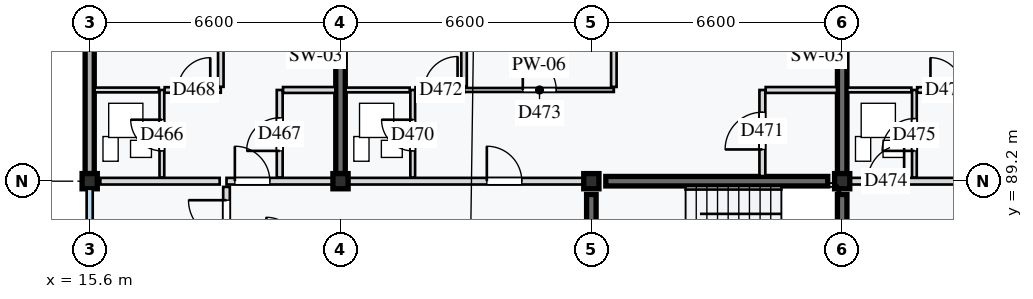
"""IFC4 building model, lengths in metres.
Left out: names, types, materials, properties, quantities, classifications, styles, units other than length and angle.
Written with IfcOpenShell. Run it as: python <this file> out.ifc"""

import sys

from ifc_helpers import new_model, si_unit, direction, frame, frame_2d, origin, origin_2d, place, context, subcontext, project, spatial, rectangle, extrude, element, fill, save


model = new_model("IFC4")
c1 = context("Model", 3, precision=1e-05, world=origin(), true_north=direction((0.0, 1.0)))
c2 = subcontext(c1, "Body", "Model", "MODEL_VIEW")
j1 = project(units=[si_unit("LENGTHUNIT", "METRE"), si_unit("PLANEANGLEUNIT", "RADIAN")], contexts=[c1])
p1 = place(None, origin())
s1 = spatial("IfcSite", under=j1, at=p1, CompositionType="ELEMENT")
p2 = place(p1, origin())
s2 = spatial("IfcBuilding", under=s1, at=p2, CompositionType="ELEMENT")
p3 = place(p2, frame((0.0, 0.0, 46.8)))
s3 = spatial("IfcBuildingStorey", under=s2, at=p3, CompositionType="ELEMENT", Elevation=46.8)
for number, where, z_axis, x_axis in (
    (1, (15.6, 89.2, 0.0), (0.0, 0.0, 1.0), (1.0, 0.0, 0.0)),
    (2, (22.2, 89.2, 0.0), (0.0, 0.0, 1.0), (1.0, 0.0, 0.0)),
    (3, (28.8, 89.2, 0.0), (0.0, 0.0, 1.0), (1.0, 0.0, 0.0)),
    (4, (35.4, 89.2, 0.0), (0.0, 0.0, 1.0), (1.0, 0.0, 0.0)),
):
    element("IfcColumn", number, at=place(p3, frame(where, z_axis=z_axis, x_axis=x_axis)), inside=s3, PredefinedType="COLUMN", context=c2, shape_type="SweptSolid", body=[
        extrude(rectangle(XDim=0.4, YDim=0.4, at=origin_2d()), origin(), (0.0, 0.0, 1.0), 3.2),
    ])
p4 = place(p3, frame((29.18, 89.2, 0.0), z_axis=(0.0, 0.0, 1.0), x_axis=(1.0, 0.0, 0.0)))
e5 = element("IfcWall", 5, at=p4, inside=s3, PredefinedType="SHEAR", context=c2, shape_type="SweptSolid", body=[
    extrude(rectangle(XDim=5.84, YDim=0.25, at=frame_2d((2.92, 0.0))), origin(), (0.0, 0.0, 1.0), 2.98),
])
for number, where, z_axis, x_axis in (
    (6, (28.8, 86.05, 0.0), (0.0, 0.0, 1.0), (0.0, 1.0, 0.0)),
    (7, (35.4, 86.05, 0.0), (0.0, 0.0, 1.0), (0.0, 1.0, 0.0)),
):
    element("IfcWall", number, at=place(p3, frame(where, z_axis=z_axis, x_axis=x_axis)), inside=s3, PredefinedType="SHEAR", context=c2, shape_type="SweptSolid", body=[
        extrude(rectangle(XDim=2.8, YDim=0.25, at=frame_2d((1.4, 0.0))), origin(), (0.0, 0.0, 1.0), 2.98),
    ])
for number, where, z_axis, x_axis in (
    (8, (22.2, 89.4, 0.0), (0.0, 0.0, 1.0), (0.0, 1.0, 0.0)),
    (9, (35.4, 89.4, 0.0), (0.0, 0.0, 1.0), (0.0, 1.0, 0.0)),
):
    element("IfcWall", number, at=place(p3, frame(where, z_axis=z_axis, x_axis=x_axis)), inside=s3, PredefinedType="SHEAR", context=c2, shape_type="SweptSolid", body=[
        extrude(rectangle(XDim=6.2, YDim=0.25, at=frame_2d((3.1, 0.0))), origin(), (0.0, 0.0, 1.0), 2.98),
    ])
p5 = place(p3, frame((15.6, 89.4, 0.0), z_axis=(0.0, 0.0, 1.0), x_axis=(0.0, 1.0, 0.0)))
e10 = element("IfcWall", 10, at=p5, inside=s3, PredefinedType="STANDARD", context=c2, shape_type="SweptSolid", body=[
    extrude(rectangle(XDim=6.2, YDim=0.24, at=frame_2d((3.1, 0.0))), origin(), (0.0, 0.0, 1.0), 2.65),
])
p6 = place(p3, frame((19.2, 86.05, 0.0), z_axis=(0.0, 0.0, 1.0), x_axis=(0.0, 1.0, 0.0)))
e11 = element("IfcWall", 11, at=p6, inside=s3, PredefinedType="PARTITIONING", context=c2, shape_type="SweptSolid", body=[
    extrude(rectangle(XDim=3.0, YDim=0.175, at=frame_2d((1.5, 0.0))), origin(), (0.0, 0.0, 1.0), 2.98),
])
p7 = place(p6, frame((1.65, 0.0, 0.0)))
e12 = element("IfcOpeningElement", 12, at=p7, cuts=e11, PredefinedType="OPENING", context=c2, shape_type="SweptSolid", body=[
    extrude(rectangle(XDim=1.0, YDim=2.1, at=frame_2d((0.5, 1.05))), frame((0.0, 0.097, 0.0), z_axis=(0.0, -1.0, 0.0), x_axis=(1.0, 0.0, 0.0)), (0.0, 0.0, 1.0), 0.195),
])
p8 = place(p3, frame((15.88, 89.2, 0.0), z_axis=(0.0, 0.0, 1.0), x_axis=(1.0, 0.0, 0.0)))
e13 = element("IfcWall", 13, at=p8, inside=s3, PredefinedType="PARTITIONING", context=c2, shape_type="SweptSolid", body=[
    extrude(rectangle(XDim=3.14, YDim=0.175, at=frame_2d((1.57, 0.0))), origin(), (0.0, 0.0, 1.0), 2.55),
])
p9 = place(p3, frame((19.2, 89.2, 0.0), z_axis=(0.0, 0.0, 1.0), x_axis=(1.0, 0.0, 0.0)))
e14 = element("IfcWall", 14, at=p9, inside=s3, PredefinedType="PARTITIONING", context=c2, shape_type="SweptSolid", body=[
    extrude(rectangle(XDim=3.0, YDim=0.175, at=frame_2d((1.5, 0.0))), origin(), (0.0, 0.0, 1.0), 2.55),
])
p10 = place(p9, frame((0.22, 0.0, 0.0)))
e15 = element("IfcOpeningElement", 15, at=p10, cuts=e14, PredefinedType="OPENING", context=c2, shape_type="SweptSolid", body=[
    extrude(rectangle(XDim=0.92, YDim=2.14, at=frame_2d((0.46, 1.07))), frame((0.0, 0.097, 0.0), z_axis=(0.0, -1.0, 0.0), x_axis=(1.0, 0.0, 0.0)), (0.0, 0.0, 1.0), 0.195),
])
p11 = place(p3, frame((17.5, 89.298, 0.0), z_axis=(0.0, 0.0, 1.0), x_axis=(0.0, 1.0, 0.0)))
e16 = element("IfcWall", 16, at=p11, inside=s3, PredefinedType="PARTITIONING", context=c2, shape_type="SweptSolid", body=[
    extrude(rectangle(XDim=2.302, YDim=0.125, at=frame_2d((1.151, 0.0))), origin(), (0.0, 0.0, 1.0), 2.98),
])
p12 = place(p11, frame((0.7, 0.0, 0.0)))
e17 = element("IfcOpeningElement", 17, at=p12, cuts=e16, PredefinedType="OPENING", context=c2, shape_type="SweptSolid", body=[
    extrude(rectangle(XDim=0.82, YDim=2.05, at=frame_2d((0.41, 1.025))), frame((0.0, 0.073, 0.0), z_axis=(0.0, -1.0, 0.0), x_axis=(1.0, 0.0, 0.0)), (0.0, 0.0, 1.0), 0.145),
])
p13 = place(p3, frame((15.73, 91.6, 0.0), z_axis=(0.0, 0.0, 1.0), x_axis=(1.0, 0.0, 0.0)))
e18 = element("IfcWall", 18, at=p13, inside=s3, PredefinedType="PARTITIONING", context=c2, shape_type="SweptSolid", body=[
    extrude(rectangle(XDim=1.69, YDim=0.125, at=frame_2d((0.845, 0.0))), origin(), (0.0, 0.0, 1.0), 2.98),
])
p14 = place(p3, frame((20.6, 89.298, 0.0), z_axis=(0.0, 0.0, 1.0), x_axis=(0.0, 1.0, 0.0)))
e19 = element("IfcWall", 19, at=p14, inside=s3, PredefinedType="PARTITIONING", context=c2, shape_type="SweptSolid", body=[
    extrude(rectangle(XDim=2.302, YDim=0.155, at=frame_2d((1.151, 0.0))), origin(), (0.0, 0.0, 1.0), 2.98),
])
p15 = place(p14, frame((0.7, 0.0, 0.0)))
e20 = element("IfcOpeningElement", 20, at=p15, cuts=e19, PredefinedType="OPENING", context=c2, shape_type="SweptSolid", body=[
    extrude(rectangle(XDim=0.87, YDim=2.08, at=frame_2d((0.435, 1.04))), frame((0.0, 0.087, 0.0), z_axis=(0.0, -1.0, 0.0), x_axis=(1.0, 0.0, 0.0)), (0.0, 0.0, 1.0), 0.175),
])
p16 = place(p3, frame((20.688, 91.6, 0.0), z_axis=(0.0, 0.0, 1.0), x_axis=(1.0, 0.0, 0.0)))
e21 = element("IfcWall", 21, at=p16, inside=s3, PredefinedType="PARTITIONING", context=c2, shape_type="SweptSolid", body=[
    extrude(rectangle(XDim=1.377, YDim=0.155, at=frame_2d((0.689, 0.0))), origin(), (0.0, 0.0, 1.0), 2.98),
])
p17 = place(p3, frame((17.573, 91.6, 0.0), z_axis=(0.0, 0.0, 1.0), x_axis=(1.0, 0.0, 0.0)))
e22 = element("IfcWall", 22, at=p17, inside=s3, PredefinedType="PARTITIONING", context=c2, shape_type="SweptSolid", body=[
    extrude(rectangle(XDim=1.478, YDim=0.145, at=frame_2d((0.739, 0.0))), origin(), (0.0, 0.0, 1.0), 2.98),
])
p18 = place(p17, frame((0.35, 0.0, 0.0)))
e23 = element("IfcOpeningElement", 23, at=p18, cuts=e22, PredefinedType="OPENING", context=c2, shape_type="SweptSolid", body=[
    extrude(rectangle(XDim=0.85, YDim=2.1, at=frame_2d((0.425, 1.05))), frame((0.0, 0.083, 0.0), z_axis=(0.0, -1.0, 0.0), x_axis=(1.0, 0.0, 0.0)), (0.0, 0.0, 1.0), 0.165),
])
p19 = place(p3, frame((19.05, 91.683, 0.0), z_axis=(0.0, 0.0, 1.0), x_axis=(0.0, 1.0, 0.0)))
e24 = element("IfcWall", 24, at=p19, inside=s3, PredefinedType="PARTITIONING", context=c2, shape_type="SweptSolid", body=[
    extrude(rectangle(XDim=3.987, YDim=0.145, at=frame_2d((1.994, 0.0))), origin(), (0.0, 0.0, 1.0), 2.98),
])
p20 = place(p3, frame((22.2, 89.2, 0.0), z_axis=(0.0, 0.0, 1.0), x_axis=(1.0, 0.0, 0.0)))
e25 = element("IfcWall", 25, at=p20, inside=s3, PredefinedType="PARTITIONING", context=c2, shape_type="SweptSolid", body=[
    extrude(rectangle(XDim=6.6, YDim=0.175, at=frame_2d((3.3, 0.0))), origin(), (0.0, 0.0, 1.0), 2.55),
])
p21 = place(p20, frame((3.85, 0.0, 0.0)))
e26 = element("IfcOpeningElement", 26, at=p21, cuts=e25, PredefinedType="OPENING", context=c2, shape_type="SweptSolid", body=[
    extrude(rectangle(XDim=0.92, YDim=2.14, at=frame_2d((0.46, 1.07))), frame((0.0, 0.097, 0.0), z_axis=(0.0, -1.0, 0.0), x_axis=(1.0, 0.0, 0.0)), (0.0, 0.0, 1.0), 0.195),
])
p22 = place(p3, frame((24.1, 89.298, 0.0), z_axis=(0.0, 0.0, 1.0), x_axis=(0.0, 1.0, 0.0)))
e27 = element("IfcWall", 27, at=p22, inside=s3, PredefinedType="PARTITIONING", context=c2, shape_type="SweptSolid", body=[
    extrude(rectangle(XDim=2.302, YDim=0.125, at=frame_2d((1.151, 0.0))), origin(), (0.0, 0.0, 1.0), 2.98),
])
p23 = place(p22, frame((0.7, 0.0, 0.0)))
e28 = element("IfcOpeningElement", 28, at=p23, cuts=e27, PredefinedType="OPENING", context=c2, shape_type="SweptSolid", body=[
    extrude(rectangle(XDim=0.82, YDim=2.05, at=frame_2d((0.41, 1.025))), frame((0.0, 0.073, 0.0), z_axis=(0.0, -1.0, 0.0), x_axis=(1.0, 0.0, 0.0)), (0.0, 0.0, 1.0), 0.145),
])
p24 = place(p3, frame((22.335, 91.6, 0.0), z_axis=(0.0, 0.0, 1.0), x_axis=(1.0, 0.0, 0.0)))
e29 = element("IfcWall", 29, at=p24, inside=s3, PredefinedType="PARTITIONING", context=c2, shape_type="SweptSolid", body=[
    extrude(rectangle(XDim=1.685, YDim=0.125, at=frame_2d((0.843, 0.0))), origin(), (0.0, 0.0, 1.0), 2.98),
])
p25 = place(p3, frame((33.3, 89.335, 0.0), z_axis=(0.0, 0.0, 1.0), x_axis=(0.0, 1.0, 0.0)))
e30 = element("IfcWall", 30, at=p25, inside=s3, PredefinedType="PARTITIONING", context=c2, shape_type="SweptSolid", body=[
    extrude(rectangle(XDim=2.265, YDim=0.155, at=frame_2d((1.133, 0.0))), origin(), (0.0, 0.0, 1.0), 2.98),
])
p26 = place(p25, frame((0.7, 0.0, 0.0)))
e31 = element("IfcOpeningElement", 31, at=p26, cuts=e30, PredefinedType="OPENING", context=c2, shape_type="SweptSolid", body=[
    extrude(rectangle(XDim=0.98, YDim=2.12, at=frame_2d((0.49, 1.06))), frame((0.0, 0.087, 0.0), z_axis=(0.0, -1.0, 0.0), x_axis=(1.0, 0.0, 0.0)), (0.0, 0.0, 1.0), 0.175),
])
p27 = place(p3, frame((33.387, 91.6, 0.0), z_axis=(0.0, 0.0, 1.0), x_axis=(1.0, 0.0, 0.0)))
e32 = element("IfcWall", 32, at=p27, inside=s3, PredefinedType="PARTITIONING", context=c2, shape_type="SweptSolid", body=[
    extrude(rectangle(XDim=1.877, YDim=0.155, at=frame_2d((0.939, 0.0))), origin(), (0.0, 0.0, 1.0), 2.98),
])
p28 = place(p3, frame((24.173, 91.6, 0.0), z_axis=(0.0, 0.0, 1.0), x_axis=(1.0, 0.0, 0.0)))
e33 = element("IfcWall", 33, at=p28, inside=s3, PredefinedType="PARTITIONING", context=c2, shape_type="SweptSolid", body=[
    extrude(rectangle(XDim=1.277, YDim=0.145, at=frame_2d((0.639, 0.0))), origin(), (0.0, 0.0, 1.0), 2.98),
])
p29 = place(p28, frame((0.228, 0.0, 0.0)))
e34 = element("IfcOpeningElement", 34, at=p29, cuts=e33, PredefinedType="OPENING", context=c2, shape_type="SweptSolid", body=[
    extrude(rectangle(XDim=0.88, YDim=2.1, at=frame_2d((0.44, 1.05))), frame((0.0, 0.083, 0.0), z_axis=(0.0, -1.0, 0.0), x_axis=(1.0, 0.0, 0.0)), (0.0, 0.0, 1.0), 0.165),
])
p30 = place(p3, frame((25.45, 91.683, 0.0), z_axis=(0.0, 0.0, 1.0), x_axis=(0.0, 1.0, 0.0)))
e35 = element("IfcWall", 35, at=p30, inside=s3, PredefinedType="PARTITIONING", context=c2, shape_type="SweptSolid", body=[
    extrude(rectangle(XDim=3.987, YDim=0.145, at=frame_2d((1.994, 0.0))), origin(), (0.0, 0.0, 1.0), 2.98),
])
p31 = place(p3, frame((25.45, 91.6, 0.0), z_axis=(0.0, 0.0, 1.0), x_axis=(1.0, 0.0, 0.0)))
e36 = element("IfcWall", 36, at=p31, inside=s3, PredefinedType="PARTITIONING", context=c2, shape_type="SweptSolid", body=[
    extrude(rectangle(XDim=3.942, YDim=0.105, at=frame_2d((1.971, 0.0))), origin(), (0.0, 0.0, 1.0), 2.98),
])
p32 = place(p31, frame((1.546, 0.0, 0.0)))
e37 = element("IfcOpeningElement", 37, at=p32, cuts=e36, PredefinedType="OPENING", context=c2, shape_type="SweptSolid", body=[
    extrude(rectangle(XDim=0.88, YDim=2.16, at=frame_2d((0.44, 1.08))), frame((0.0, 0.062, 0.0), z_axis=(0.0, -1.0, 0.0), x_axis=(1.0, 0.0, 0.0)), (0.0, 0.0, 1.0), 0.125),
])
p33 = place(p3, frame((29.392, 91.68, 0.0), z_axis=(0.0, 0.0, 1.0), x_axis=(0.0, 1.0, 0.0)))
e38 = element("IfcWall", 38, at=p33, inside=s3, PredefinedType="PARTITIONING", context=c2, shape_type="SweptSolid", body=[
    extrude(rectangle(XDim=3.99, YDim=0.145, at=frame_2d((1.995, 0.0))), origin(), (0.0, 0.0, 1.0), 2.98),
])
p34 = place(p3, frame((35.4, 89.2, 0.0), z_axis=(0.0, 0.0, 1.0), x_axis=(1.0, 0.0, 0.0)))
e39 = element("IfcWall", 39, at=p34, inside=s3, PredefinedType="PARTITIONING", context=c2, shape_type="SweptSolid", body=[
    extrude(rectangle(XDim=13.2, YDim=0.175, at=frame_2d((6.6, 0.0))), origin(), (0.0, 0.0, 1.0), 2.55),
])
p35 = place(p34, frame((0.67, 0.0, 0.0)))
e40 = element("IfcOpeningElement", 40, at=p35, cuts=e39, PredefinedType="OPENING", context=c2, shape_type="SweptSolid", body=[
    extrude(rectangle(XDim=0.96, YDim=2.18, at=frame_2d((0.48, 1.09))), frame((0.0, 0.097, 0.0), z_axis=(0.0, -1.0, 0.0), x_axis=(1.0, 0.0, 0.0)), (0.0, 0.0, 1.0), 0.195),
])
p36 = place(p3, frame((37.3, 89.298, 0.0), z_axis=(0.0, 0.0, 1.0), x_axis=(0.0, 1.0, 0.0)))
e41 = element("IfcWall", 41, at=p36, inside=s3, PredefinedType="PARTITIONING", context=c2, shape_type="SweptSolid", body=[
    extrude(rectangle(XDim=2.302, YDim=0.125, at=frame_2d((1.151, 0.0))), origin(), (0.0, 0.0, 1.0), 2.98),
])
p37 = place(p36, frame((0.7, 0.0, 0.0)))
e42 = element("IfcOpeningElement", 42, at=p37, cuts=e41, PredefinedType="OPENING", context=c2, shape_type="SweptSolid", body=[
    extrude(rectangle(XDim=0.85, YDim=2.04, at=frame_2d((0.425, 1.02))), frame((0.0, 0.073, 0.0), z_axis=(0.0, -1.0, 0.0), x_axis=(1.0, 0.0, 0.0)), (0.0, 0.0, 1.0), 0.145),
])
p38 = place(p3, frame((35.535, 91.6, 0.0), z_axis=(0.0, 0.0, 1.0), x_axis=(1.0, 0.0, 0.0)))
e43 = element("IfcWall", 43, at=p38, inside=s3, PredefinedType="PARTITIONING", context=c2, shape_type="SweptSolid", body=[
    extrude(rectangle(XDim=1.685, YDim=0.125, at=frame_2d((0.843, 0.0))), origin(), (0.0, 0.0, 1.0), 2.98),
])
p39 = place(p3, frame((37.373, 91.6, 0.0), z_axis=(0.0, 0.0, 1.0), x_axis=(1.0, 0.0, 0.0)))
e44 = element("IfcWall", 44, at=p39, inside=s3, PredefinedType="PARTITIONING", context=c2, shape_type="SweptSolid", body=[
    extrude(rectangle(XDim=1.478, YDim=0.145, at=frame_2d((0.739, 0.0))), origin(), (0.0, 0.0, 1.0), 2.98),
])
p40 = place(p39, frame((0.35, 0.0, 0.0)))
e45 = element("IfcOpeningElement", 45, at=p40, cuts=e44, PredefinedType="OPENING", context=c2, shape_type="SweptSolid", body=[
    extrude(rectangle(XDim=0.85, YDim=2.1, at=frame_2d((0.425, 1.05))), frame((0.0, 0.083, 0.0), z_axis=(0.0, -1.0, 0.0), x_axis=(1.0, 0.0, 0.0)), (0.0, 0.0, 1.0), 0.165),
])
p41 = place(p7, origin())
e46 = element("IfcDoor", 46, at=p41, inside=s3, OperationType="SINGLE_SWING_RIGHT", PredefinedType="DOOR", context=c2, shape_type="SweptSolid", body=[
    extrude(rectangle(XDim=1.0, YDim=2.1, at=frame_2d((0.5, 1.05))), frame((0.0, 0.025, 0.0), z_axis=(0.0, -1.0, 0.0), x_axis=(1.0, 0.0, 0.0)), (0.0, 0.0, 1.0), 0.05),
])
fill(e12, e46)
p42 = place(p10, origin())
e47 = element("IfcDoor", 47, at=p42, inside=s3, OperationType="SINGLE_SWING_LEFT", PredefinedType="DOOR", context=c2, shape_type="SweptSolid", body=[
    extrude(rectangle(XDim=0.92, YDim=2.14, at=frame_2d((0.46, 1.07))), frame((0.0, 0.025, 0.0), z_axis=(0.0, -1.0, 0.0), x_axis=(1.0, 0.0, 0.0)), (0.0, 0.0, 1.0), 0.05),
])
fill(e15, e47)
p43 = place(p12, origin())
e48 = element("IfcDoor", 48, at=p43, inside=s3, OperationType="SINGLE_SWING_RIGHT", PredefinedType="DOOR", context=c2, shape_type="SweptSolid", body=[
    extrude(rectangle(XDim=0.82, YDim=2.05, at=frame_2d((0.41, 1.025))), frame((0.0, 0.025, 0.0), z_axis=(0.0, -1.0, 0.0), x_axis=(1.0, 0.0, 0.0)), (0.0, 0.0, 1.0), 0.05),
])
fill(e17, e48)
p44 = place(p15, origin())
e49 = element("IfcDoor", 49, at=p44, inside=s3, OperationType="SINGLE_SWING_LEFT", PredefinedType="DOOR", context=c2, shape_type="SweptSolid", body=[
    extrude(rectangle(XDim=0.87, YDim=2.08, at=frame_2d((0.435, 1.04))), frame((0.0, 0.025, 0.0), z_axis=(0.0, -1.0, 0.0), x_axis=(1.0, 0.0, 0.0)), (0.0, 0.0, 1.0), 0.05),
])
fill(e20, e49)
p45 = place(p18, origin())
e50 = element("IfcDoor", 50, at=p45, inside=s3, OperationType="SINGLE_SWING_RIGHT", PredefinedType="DOOR", context=c2, shape_type="SweptSolid", body=[
    extrude(rectangle(XDim=0.85, YDim=2.1, at=frame_2d((0.425, 1.05))), frame((0.0, 0.025, 0.0), z_axis=(0.0, -1.0, 0.0), x_axis=(1.0, 0.0, 0.0)), (0.0, 0.0, 1.0), 0.05),
])
fill(e23, e50)
p46 = place(p21, origin())
e51 = element("IfcDoor", 51, at=p46, inside=s3, OperationType="SINGLE_SWING_LEFT", PredefinedType="DOOR", context=c2, shape_type="SweptSolid", body=[
    extrude(rectangle(XDim=0.92, YDim=2.14, at=frame_2d((0.46, 1.07))), frame((0.0, 0.025, 0.0), z_axis=(0.0, -1.0, 0.0), x_axis=(1.0, 0.0, 0.0)), (0.0, 0.0, 1.0), 0.05),
])
fill(e26, e51)
p47 = place(p23, origin())
e52 = element("IfcDoor", 52, at=p47, inside=s3, OperationType="SINGLE_SWING_RIGHT", PredefinedType="DOOR", context=c2, shape_type="SweptSolid", body=[
    extrude(rectangle(XDim=0.82, YDim=2.05, at=frame_2d((0.41, 1.025))), frame((0.0, 0.025, 0.0), z_axis=(0.0, -1.0, 0.0), x_axis=(1.0, 0.0, 0.0)), (0.0, 0.0, 1.0), 0.05),
])
fill(e28, e52)
p48 = place(p26, origin())
e53 = element("IfcDoor", 53, at=p48, inside=s3, OperationType="SINGLE_SWING_LEFT", PredefinedType="DOOR", context=c2, shape_type="SweptSolid", body=[
    extrude(rectangle(XDim=0.98, YDim=2.12, at=frame_2d((0.49, 1.06))), frame((0.0, 0.025, 0.0), z_axis=(0.0, -1.0, 0.0), x_axis=(1.0, 0.0, 0.0)), (0.0, 0.0, 1.0), 0.05),
])
fill(e31, e53)
p49 = place(p29, origin())
e54 = element("IfcDoor", 54, at=p49, inside=s3, OperationType="SINGLE_SWING_RIGHT", PredefinedType="DOOR", context=c2, shape_type="SweptSolid", body=[
    extrude(rectangle(XDim=0.88, YDim=2.1, at=frame_2d((0.44, 1.05))), frame((0.0, 0.025, 0.0), z_axis=(0.0, -1.0, 0.0), x_axis=(1.0, 0.0, 0.0)), (0.0, 0.0, 1.0), 0.05),
])
fill(e34, e54)
p50 = place(p32, origin())
e55 = element("IfcDoor", 55, at=p50, inside=s3, OperationType="SINGLE_SWING_LEFT", PredefinedType="DOOR", context=c2, shape_type="SweptSolid", body=[
    extrude(rectangle(XDim=0.88, YDim=2.16, at=frame_2d((0.44, 1.08))), frame((0.0, 0.025, 0.0), z_axis=(0.0, -1.0, 0.0), x_axis=(1.0, 0.0, 0.0)), (0.0, 0.0, 1.0), 0.05),
])
fill(e37, e55)
p51 = place(p35, origin())
e56 = element("IfcDoor", 56, at=p51, inside=s3, OperationType="SINGLE_SWING_RIGHT", PredefinedType="DOOR", context=c2, shape_type="SweptSolid", body=[
    extrude(rectangle(XDim=0.96, YDim=2.18, at=frame_2d((0.48, 1.09))), frame((0.0, 0.025, 0.0), z_axis=(0.0, -1.0, 0.0), x_axis=(1.0, 0.0, 0.0)), (0.0, 0.0, 1.0), 0.05),
])
fill(e40, e56)
p52 = place(p37, origin())
e57 = element("IfcDoor", 57, at=p52, inside=s3, OperationType="SINGLE_SWING_LEFT", PredefinedType="DOOR", context=c2, shape_type="SweptSolid", body=[
    extrude(rectangle(XDim=0.85, YDim=2.04, at=frame_2d((0.425, 1.02))), frame((0.0, 0.025, 0.0), z_axis=(0.0, -1.0, 0.0), x_axis=(1.0, 0.0, 0.0)), (0.0, 0.0, 1.0), 0.05),
])
fill(e42, e57)
p53 = place(p40, origin())
e58 = element("IfcDoor", 58, at=p53, inside=s3, OperationType="SINGLE_SWING_LEFT", PredefinedType="DOOR", context=c2, shape_type="SweptSolid", body=[
    extrude(rectangle(XDim=0.85, YDim=2.1, at=frame_2d((0.425, 1.05))), frame((0.0, 0.025, 0.0), z_axis=(0.0, -1.0, 0.0), x_axis=(1.0, 0.0, 0.0)), (0.0, 0.0, 1.0), 0.05),
])
fill(e45, e58)
save(model, sys.argv[1])
